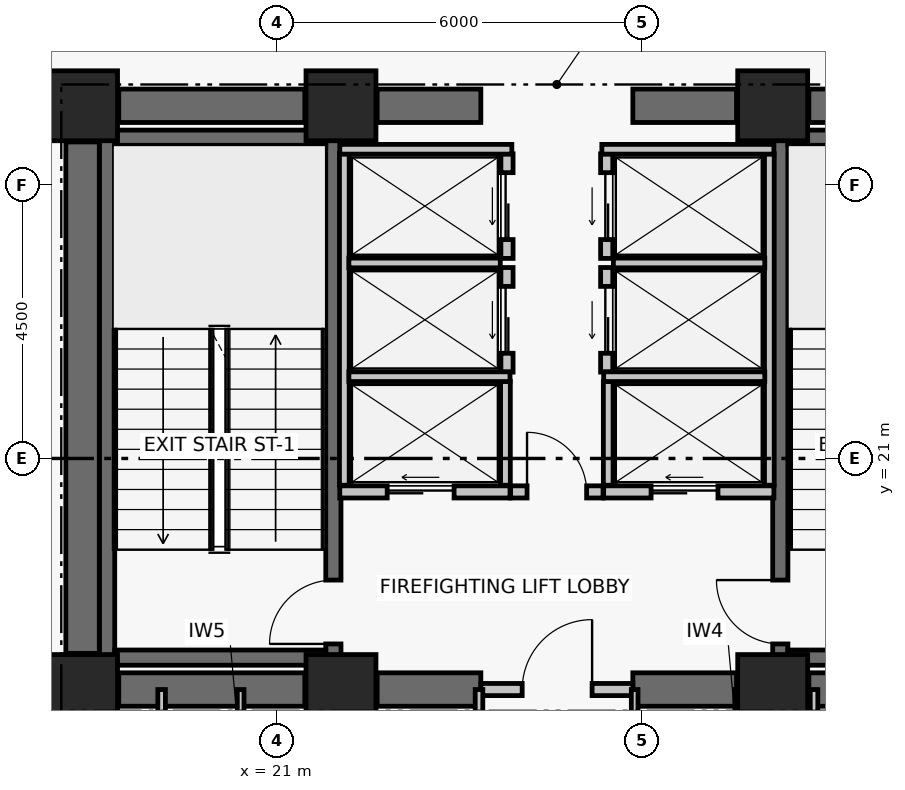
"""IFC4 building model, lengths in metres.
Left out: names, types, materials, properties, quantities, classifications, styles, units other than length and angle.
Written with IfcOpenShell. Run it as: python <this file> out.ifc"""

import sys

from ifc_helpers import new_model, si_unit, direction, frame, frame_2d, origin, origin_2d, place, context, subcontext, project, spatial, rectangle, extrude, element, fill, save


model = new_model("IFC4")
c1 = context("Model", 3, precision=1e-05, world=origin(), true_north=direction((0.0, 1.0)))
c2 = subcontext(c1, "Body", "Model", "MODEL_VIEW")
j1 = project(units=[si_unit("LENGTHUNIT", "METRE"), si_unit("PLANEANGLEUNIT", "RADIAN")], contexts=[c1])
p1 = place(None, origin())
s1 = spatial("IfcSite", under=j1, at=p1, CompositionType="ELEMENT")
p2 = place(p1, origin())
s2 = spatial("IfcBuilding", under=s1, at=p2, CompositionType="ELEMENT")
p3 = place(p2, frame((0.0, 0.0, 89.1)))
s3 = spatial("IfcBuildingStorey", under=s2, at=p3, CompositionType="ELEMENT", Elevation=89.1)
for number, where, z_axis, x_axis in (
    (1, (17.8, 17.2, 0.0), (0.0, 0.0, 1.0), (1.0, 0.0, 0.0)),
    (2, (22.05, 17.2, 0.0), (0.0, 0.0, 1.0), (1.0, 0.0, 0.0)),
    (3, (29.15, 17.2, 0.0), (0.0, 0.0, 1.0), (1.0, 0.0, 0.0)),
    (4, (17.8, 26.8, 0.0), (0.0, 0.0, 1.0), (1.0, 0.0, 0.0)),
    (5, (22.05, 26.8, 0.0), (0.0, 0.0, 1.0), (1.0, 0.0, 0.0)),
    (6, (29.15, 26.8, 0.0), (0.0, 0.0, 1.0), (1.0, 0.0, 0.0)),
):
    element("IfcColumn", number, at=place(p3, frame(where, z_axis=z_axis, x_axis=x_axis)), inside=s3, PredefinedType="COLUMN", context=c2, shape_type="SweptSolid", body=[
        extrude(rectangle(XDim=1.15, YDim=1.15, at=origin_2d()), origin(), (0.0, 0.0, 1.0), 3.72),
    ])
p4 = place(p3, frame((18.395, 17.2, 0.0), z_axis=(0.0, 0.0, 1.0), x_axis=(1.0, 0.0, 0.0)))
e7 = element("IfcWall", 7, at=p4, inside=s3, PredefinedType="SHEAR", context=c2, shape_type="SweptSolid", body=[
    extrude(rectangle(XDim=3.06, YDim=0.55, at=frame_2d((1.53, 0.0))), origin(), (0.0, 0.0, 1.0), 3.47),
])
p5 = place(p3, frame((22.645, 17.2, 0.0), z_axis=(0.0, 0.0, 1.0), x_axis=(1.0, 0.0, 0.0)))
e8 = element("IfcWall", 8, at=p5, inside=s3, PredefinedType="SHEAR", context=c2, shape_type="SweptSolid", body=[
    extrude(rectangle(XDim=1.705, YDim=0.55, at=frame_2d((0.853, 0.0))), origin(), (0.0, 0.0, 1.0), 3.47),
])
p6 = place(p3, frame((26.85, 17.2, 0.0), z_axis=(0.0, 0.0, 1.0), x_axis=(1.0, 0.0, 0.0)))
e9 = element("IfcWall", 9, at=p6, inside=s3, PredefinedType="SHEAR", context=c2, shape_type="SweptSolid", body=[
    extrude(rectangle(XDim=1.705, YDim=0.55, at=frame_2d((0.853, 0.0))), origin(), (0.0, 0.0, 1.0), 3.47),
])
p7 = place(p3, frame((29.745, 17.2, 0.0), z_axis=(0.0, 0.0, 1.0), x_axis=(1.0, 0.0, 0.0)))
e10 = element("IfcWall", 10, at=p7, inside=s3, PredefinedType="SHEAR", context=c2, shape_type="SweptSolid", body=[
    extrude(rectangle(XDim=3.06, YDim=0.55, at=frame_2d((1.53, 0.0))), origin(), (0.0, 0.0, 1.0), 3.47),
])
p8 = place(p3, frame((18.395, 26.8, 0.0), z_axis=(0.0, 0.0, 1.0), x_axis=(1.0, 0.0, 0.0)))
e11 = element("IfcWall", 11, at=p8, inside=s3, PredefinedType="SHEAR", context=c2, shape_type="SweptSolid", body=[
    extrude(rectangle(XDim=3.06, YDim=0.55, at=frame_2d((1.53, 0.0))), origin(), (0.0, 0.0, 1.0), 3.47),
])
p9 = place(p3, frame((22.645, 26.8, 0.0), z_axis=(0.0, 0.0, 1.0), x_axis=(1.0, 0.0, 0.0)))
e12 = element("IfcWall", 12, at=p9, inside=s3, PredefinedType="SHEAR", context=c2, shape_type="SweptSolid", body=[
    extrude(rectangle(XDim=1.705, YDim=0.55, at=frame_2d((0.853, 0.0))), origin(), (0.0, 0.0, 1.0), 3.47),
])
p10 = place(p3, frame((26.85, 26.8, 0.0), z_axis=(0.0, 0.0, 1.0), x_axis=(1.0, 0.0, 0.0)))
e13 = element("IfcWall", 13, at=p10, inside=s3, PredefinedType="SHEAR", context=c2, shape_type="SweptSolid", body=[
    extrude(rectangle(XDim=1.705, YDim=0.55, at=frame_2d((0.853, 0.0))), origin(), (0.0, 0.0, 1.0), 3.47),
])
p11 = place(p3, frame((29.745, 26.8, 0.0), z_axis=(0.0, 0.0, 1.0), x_axis=(1.0, 0.0, 0.0)))
e14 = element("IfcWall", 14, at=p11, inside=s3, PredefinedType="SHEAR", context=c2, shape_type="SweptSolid", body=[
    extrude(rectangle(XDim=3.06, YDim=0.55, at=frame_2d((1.53, 0.0))), origin(), (0.0, 0.0, 1.0), 3.47),
])
p12 = place(p3, frame((17.8, 17.795, 0.0), z_axis=(0.0, 0.0, 1.0), x_axis=(0.0, 1.0, 0.0)))
e15 = element("IfcWall", 15, at=p12, inside=s3, PredefinedType="SHEAR", context=c2, shape_type="SweptSolid", body=[
    extrude(rectangle(XDim=8.41, YDim=0.55, at=frame_2d((4.205, 0.0))), origin(), (0.0, 0.0, 1.0), 3.47),
])
p13 = place(p3, frame((18.204, 17.6, 0.0), z_axis=(0.0, 0.0, 1.0), x_axis=(0.0, 1.0, 0.0)))
e16 = element("IfcWall", 16, at=p13, inside=s3, PredefinedType="SHEAR", context=c2, shape_type="SweptSolid", body=[
    extrude(rectangle(XDim=8.8, YDim=0.25, at=frame_2d((4.4, 0.0))), origin(), (0.0, 0.0, 1.0), 3.47),
])
p14 = place(p3, frame((21.925, 17.6, 0.0), z_axis=(0.0, 0.0, 1.0), x_axis=(0.0, 1.0, 0.0)))
e17 = element("IfcWall", 17, at=p14, inside=s3, PredefinedType="SHEAR", context=c2, shape_type="SweptSolid", body=[
    extrude(rectangle(XDim=8.8, YDim=0.25, at=frame_2d((4.4, 0.0))), origin(), (0.0, 0.0, 1.0), 3.47),
])
p15 = place(p14, frame((0.35, 0.0, 0.0)))
e18 = element("IfcOpeningElement", 18, at=p15, cuts=e17, PredefinedType="OPENING", context=c2, shape_type="SweptSolid", body=[
    extrude(rectangle(XDim=1.05, YDim=2.08, at=frame_2d((0.525, 1.04))), frame((0.0, 0.135, 0.0), z_axis=(0.0, -1.0, 0.0), x_axis=(1.0, 0.0, 0.0)), (0.0, 0.0, 1.0), 0.27),
])
for number, where, z_axis, x_axis in (
    (19, (18.329, 17.725, 0.0), (0.0, 0.0, 1.0), (1.0, 0.0, 0.0)),
    (20, (18.329, 26.275, 0.0), (0.0, 0.0, 1.0), (1.0, 0.0, 0.0)),
):
    element("IfcWall", number, at=place(p3, frame(where, z_axis=z_axis, x_axis=x_axis)), inside=s3, PredefinedType="SHEAR", context=c2, shape_type="SweptSolid", body=[
        extrude(rectangle(XDim=3.471, YDim=0.25, at=frame_2d((1.735, 0.0))), origin(), (0.0, 0.0, 1.0), 3.47),
    ])
p16 = place(p3, frame((29.275, 17.6, 0.0), z_axis=(0.0, 0.0, 1.0), x_axis=(0.0, 1.0, 0.0)))
e21 = element("IfcWall", 21, at=p16, inside=s3, PredefinedType="SHEAR", context=c2, shape_type="SweptSolid", body=[
    extrude(rectangle(XDim=8.8, YDim=0.25, at=frame_2d((4.4, 0.0))), origin(), (0.0, 0.0, 1.0), 3.47),
])
p17 = place(p16, frame((0.35, 0.0, 0.0)))
e22 = element("IfcOpeningElement", 22, at=p17, cuts=e21, PredefinedType="OPENING", context=c2, shape_type="SweptSolid", body=[
    extrude(rectangle(XDim=1.05, YDim=2.08, at=frame_2d((0.525, 1.04))), frame((0.0, 0.135, 0.0), z_axis=(0.0, -1.0, 0.0), x_axis=(1.0, 0.0, 0.0)), (0.0, 0.0, 1.0), 0.27),
])
for number, where, z_axis, x_axis in (
    (23, (29.4, 17.725, 0.0), (0.0, 0.0, 1.0), (1.0, 0.0, 0.0)),
    (24, (29.4, 26.275, 0.0), (0.0, 0.0, 1.0), (1.0, 0.0, 0.0)),
):
    element("IfcWall", number, at=place(p3, frame(where, z_axis=z_axis, x_axis=x_axis)), inside=s3, PredefinedType="SHEAR", context=c2, shape_type="SweptSolid", body=[
        extrude(rectangle(XDim=3.471, YDim=0.25, at=frame_2d((1.736, 0.0))), origin(), (0.0, 0.0, 1.0), 3.47),
    ])
p18 = place(p3, frame((24.35, 17.2, 0.0), z_axis=(0.0, 0.0, 1.0), x_axis=(1.0, 0.0, 0.0)))
e25 = element("IfcWall", 25, at=p18, inside=s3, PredefinedType="PARTITIONING", context=c2, shape_type="SweptSolid", body=[
    extrude(rectangle(XDim=2.5, YDim=0.2, at=frame_2d((1.25, 0.0))), origin(), (0.0, 0.0, 1.0), 2.6),
])
p19 = place(p18, frame((0.68, 0.0, 0.0)))
e26 = element("IfcOpeningElement", 26, at=p19, cuts=e25, PredefinedType="OPENING", context=c2, shape_type="SweptSolid", body=[
    extrude(rectangle(XDim=1.15, YDim=2.08, at=frame_2d((0.575, 1.04))), frame((0.0, 0.11, 0.0), z_axis=(0.0, -1.0, 0.0), x_axis=(1.0, 0.0, 0.0)), (0.0, 0.0, 1.0), 0.22),
])
p20 = place(p3, frame((24.84, 20.45, 0.0), z_axis=(0.0, 0.0, 1.0), x_axis=(1.0, 0.0, 0.0)))
e27 = element("IfcWall", 27, at=p20, inside=s3, PredefinedType="PARTITIONING", context=c2, shape_type="SweptSolid", body=[
    extrude(rectangle(XDim=1.52, YDim=0.2, at=frame_2d((0.76, 0.0))), origin(), (0.0, 0.0, 1.0), 3.47),
])
p21 = place(p20, frame((0.27, 0.0, 0.0)))
e28 = element("IfcOpeningElement", 28, at=p21, cuts=e27, PredefinedType="OPENING", context=c2, shape_type="SweptSolid", body=[
    extrude(rectangle(XDim=0.98, YDim=2.06, at=frame_2d((0.49, 1.03))), frame((0.0, 0.11, 0.0), z_axis=(0.0, -1.0, 0.0), x_axis=(1.0, 0.0, 0.0)), (0.0, 0.0, 1.0), 0.22),
])
p22 = place(p3, frame((22.03, 20.45, 0.0), z_axis=(0.0, 0.0, 1.0), x_axis=(1.0, 0.0, 0.0)))
e29 = element("IfcWall", 29, at=p22, inside=s3, PredefinedType="PARTITIONING", context=c2, shape_type="SweptSolid", body=[
    extrude(rectangle(XDim=2.8, YDim=0.2, at=frame_2d((1.4, 0.0))), origin(), (0.0, 0.0, 1.0), 3.47),
])
p23 = place(p22, frame((0.78, 0.0, 0.0)))
e30 = element("IfcOpeningElement", 30, at=p23, cuts=e29, PredefinedType="OPENING", context=c2, shape_type="SweptSolid", body=[
    extrude(rectangle(XDim=1.1, YDim=2.08, at=frame_2d((0.55, 1.04))), frame((0.0, 0.11, 0.0), z_axis=(0.0, -1.0, 0.0), x_axis=(1.0, 0.0, 0.0)), (0.0, 0.0, 1.0), 0.22),
])
p24 = place(p3, frame((26.37, 20.45, 0.0), z_axis=(0.0, 0.0, 1.0), x_axis=(1.0, 0.0, 0.0)))
e31 = element("IfcWall", 31, at=p24, inside=s3, PredefinedType="PARTITIONING", context=c2, shape_type="SweptSolid", body=[
    extrude(rectangle(XDim=2.8, YDim=0.2, at=frame_2d((1.4, 0.0))), origin(), (0.0, 0.0, 1.0), 3.47),
])
p25 = place(p24, frame((0.78, 0.0, 0.0)))
e32 = element("IfcOpeningElement", 32, at=p25, cuts=e31, PredefinedType="OPENING", context=c2, shape_type="SweptSolid", body=[
    extrude(rectangle(XDim=1.1, YDim=2.08, at=frame_2d((0.55, 1.04))), frame((0.0, 0.11, 0.0), z_axis=(0.0, -1.0, 0.0), x_axis=(1.0, 0.0, 0.0)), (0.0, 0.0, 1.0), 0.22),
])
p26 = place(p3, frame((24.78, 22.42, 0.0), z_axis=(0.0, 0.0, 1.0), x_axis=(0.0, 1.0, 0.0)))
e33 = element("IfcWall", 33, at=p26, inside=s3, PredefinedType="PARTITIONING", context=c2, shape_type="SweptSolid", body=[
    extrude(rectangle(XDim=1.72, YDim=0.2, at=frame_2d((0.86, 0.0))), origin(), (0.0, 0.0, 1.0), 3.47),
])
p27 = place(p26, frame((0.31, 0.0, 0.0)))
e34 = element("IfcOpeningElement", 34, at=p27, cuts=e33, PredefinedType="OPENING", context=c2, shape_type="SweptSolid", body=[
    extrude(rectangle(XDim=1.1, YDim=2.08, at=frame_2d((0.55, 1.04))), frame((0.0, 0.11, 0.0), z_axis=(0.0, -1.0, 0.0), x_axis=(1.0, 0.0, 0.0)), (0.0, 0.0, 1.0), 0.22),
])
p28 = place(p3, frame((24.78, 24.29, 0.0), z_axis=(0.0, 0.0, 1.0), x_axis=(0.0, 1.0, 0.0)))
e35 = element("IfcWall", 35, at=p28, inside=s3, PredefinedType="PARTITIONING", context=c2, shape_type="SweptSolid", body=[
    extrude(rectangle(XDim=1.72, YDim=0.2, at=frame_2d((0.86, 0.0))), origin(), (0.0, 0.0, 1.0), 3.47),
])
p29 = place(p28, frame((0.31, 0.0, 0.0)))
e36 = element("IfcOpeningElement", 36, at=p29, cuts=e35, PredefinedType="OPENING", context=c2, shape_type="SweptSolid", body=[
    extrude(rectangle(XDim=1.1, YDim=2.08, at=frame_2d((0.55, 1.04))), frame((0.0, 0.11, 0.0), z_axis=(0.0, -1.0, 0.0), x_axis=(1.0, 0.0, 0.0)), (0.0, 0.0, 1.0), 0.22),
])
p30 = place(p3, frame((26.42, 22.42, 0.0), z_axis=(0.0, 0.0, 1.0), x_axis=(0.0, 1.0, 0.0)))
e37 = element("IfcWall", 37, at=p30, inside=s3, PredefinedType="PARTITIONING", context=c2, shape_type="SweptSolid", body=[
    extrude(rectangle(XDim=1.72, YDim=0.2, at=frame_2d((0.86, 0.0))), origin(), (0.0, 0.0, 1.0), 3.47),
])
p31 = place(p30, frame((0.31, 0.0, 0.0)))
e38 = element("IfcOpeningElement", 38, at=p31, cuts=e37, PredefinedType="OPENING", context=c2, shape_type="SweptSolid", body=[
    extrude(rectangle(XDim=1.1, YDim=2.08, at=frame_2d((0.55, 1.04))), frame((0.0, 0.11, 0.0), z_axis=(0.0, -1.0, 0.0), x_axis=(1.0, 0.0, 0.0)), (0.0, 0.0, 1.0), 0.22),
])
p32 = place(p3, frame((26.42, 24.29, 0.0), z_axis=(0.0, 0.0, 1.0), x_axis=(0.0, 1.0, 0.0)))
e39 = element("IfcWall", 39, at=p32, inside=s3, PredefinedType="PARTITIONING", context=c2, shape_type="SweptSolid", body=[
    extrude(rectangle(XDim=1.72, YDim=0.2, at=frame_2d((0.86, 0.0))), origin(), (0.0, 0.0, 1.0), 3.47),
])
p33 = place(p32, frame((0.31, 0.0, 0.0)))
e40 = element("IfcOpeningElement", 40, at=p33, cuts=e39, PredefinedType="OPENING", context=c2, shape_type="SweptSolid", body=[
    extrude(rectangle(XDim=1.1, YDim=2.08, at=frame_2d((0.55, 1.04))), frame((0.0, 0.11, 0.0), z_axis=(0.0, -1.0, 0.0), x_axis=(1.0, 0.0, 0.0)), (0.0, 0.0, 1.0), 0.22),
])
p34 = place(p3, frame((22.105, 20.56, 0.0), z_axis=(0.0, 0.0, 1.0), x_axis=(0.0, 1.0, 0.0)))
e41 = element("IfcWall", 41, at=p34, inside=s3, PredefinedType="PARTITIONING", context=c2, shape_type="SweptSolid", body=[
    extrude(rectangle(XDim=5.45, YDim=0.16, at=frame_2d((2.725, 0.0))), origin(), (0.0, 0.0, 1.0), 3.47),
])
p35 = place(p3, frame((24.755, 20.56, 0.0), z_axis=(0.0, 0.0, 1.0), x_axis=(0.0, 1.0, 0.0)))
e42 = element("IfcWall", 42, at=p35, inside=s3, PredefinedType="PARTITIONING", context=c2, shape_type="SweptSolid", body=[
    extrude(rectangle(XDim=1.71, YDim=0.16, at=frame_2d((0.855, 0.0))), origin(), (0.0, 0.0, 1.0), 3.47),
])
p36 = place(p3, frame((22.18, 22.345, 0.0), z_axis=(0.0, 0.0, 1.0), x_axis=(1.0, 0.0, 0.0)))
e43 = element("IfcWall", 43, at=p36, inside=s3, PredefinedType="PARTITIONING", context=c2, shape_type="SweptSolid", body=[
    extrude(rectangle(XDim=2.65, YDim=0.16, at=frame_2d((1.325, 0.0))), origin(), (0.0, 0.0, 1.0), 3.47),
])
p37 = place(p3, frame((22.18, 24.215, 0.0), z_axis=(0.0, 0.0, 1.0), x_axis=(1.0, 0.0, 0.0)))
e44 = element("IfcWall", 44, at=p37, inside=s3, PredefinedType="PARTITIONING", context=c2, shape_type="SweptSolid", body=[
    extrude(rectangle(XDim=2.49, YDim=0.16, at=frame_2d((1.245, 0.0))), origin(), (0.0, 0.0, 1.0), 3.47),
])
p38 = place(p3, frame((22.03, 26.085, 0.0), z_axis=(0.0, 0.0, 1.0), x_axis=(1.0, 0.0, 0.0)))
e45 = element("IfcWall", 45, at=p38, inside=s3, PredefinedType="PARTITIONING", context=c2, shape_type="SweptSolid", body=[
    extrude(rectangle(XDim=2.83, YDim=0.16, at=frame_2d((1.415, 0.0))), origin(), (0.0, 0.0, 1.0), 3.47),
])
p39 = place(p3, frame((29.095, 20.56, 0.0), z_axis=(0.0, 0.0, 1.0), x_axis=(0.0, 1.0, 0.0)))
e46 = element("IfcWall", 46, at=p39, inside=s3, PredefinedType="PARTITIONING", context=c2, shape_type="SweptSolid", body=[
    extrude(rectangle(XDim=5.45, YDim=0.16, at=frame_2d((2.725, 0.0))), origin(), (0.0, 0.0, 1.0), 3.47),
])
p40 = place(p3, frame((26.445, 20.56, 0.0), z_axis=(0.0, 0.0, 1.0), x_axis=(0.0, 1.0, 0.0)))
e47 = element("IfcWall", 47, at=p40, inside=s3, PredefinedType="PARTITIONING", context=c2, shape_type="SweptSolid", body=[
    extrude(rectangle(XDim=1.71, YDim=0.16, at=frame_2d((0.855, 0.0))), origin(), (0.0, 0.0, 1.0), 3.47),
])
p41 = place(p3, frame((26.37, 22.345, 0.0), z_axis=(0.0, 0.0, 1.0), x_axis=(1.0, 0.0, 0.0)))
e48 = element("IfcWall", 48, at=p41, inside=s3, PredefinedType="PARTITIONING", context=c2, shape_type="SweptSolid", body=[
    extrude(rectangle(XDim=2.65, YDim=0.16, at=frame_2d((1.325, 0.0))), origin(), (0.0, 0.0, 1.0), 3.47),
])
p42 = place(p3, frame((26.53, 24.215, 0.0), z_axis=(0.0, 0.0, 1.0), x_axis=(1.0, 0.0, 0.0)))
e49 = element("IfcWall", 49, at=p42, inside=s3, PredefinedType="PARTITIONING", context=c2, shape_type="SweptSolid", body=[
    extrude(rectangle(XDim=2.49, YDim=0.16, at=frame_2d((1.245, 0.0))), origin(), (0.0, 0.0, 1.0), 3.47),
])
p43 = place(p3, frame((26.34, 26.085, 0.0), z_axis=(0.0, 0.0, 1.0), x_axis=(1.0, 0.0, 0.0)))
e50 = element("IfcWall", 50, at=p43, inside=s3, PredefinedType="PARTITIONING", context=c2, shape_type="SweptSolid", body=[
    extrude(rectangle(XDim=2.83, YDim=0.16, at=frame_2d((1.415, 0.0))), origin(), (0.0, 0.0, 1.0), 3.47),
])
p44 = place(p3, frame((19.1, 14.95, 0.0), z_axis=(0.0, 0.0, 1.0), x_axis=(0.0, 1.0, 0.0)))
e51 = element("IfcWall", 51, at=p44, inside=s3, PredefinedType="PARTITIONING", context=c2, shape_type="SweptSolid", body=[
    extrude(rectangle(XDim=2.25, YDim=0.125, at=frame_2d((1.125, 0.0))), origin(), (0.0, 0.0, 1.0), 2.6),
])
p45 = place(p3, frame((20.4, 14.95, 0.0), z_axis=(0.0, 0.0, 1.0), x_axis=(0.0, 1.0, 0.0)))
e52 = element("IfcWall", 52, at=p45, inside=s3, PredefinedType="PARTITIONING", context=c2, shape_type="SweptSolid", body=[
    extrude(rectangle(XDim=2.25, YDim=0.11, at=frame_2d((1.125, 0.0))), origin(), (0.0, 0.0, 1.0), 2.6),
])
for number, where, z_axis, x_axis in (
    (53, (22.36, 14.95, 0.0), (0.0, 0.0, 1.0), (0.0, 1.0, 0.0)),
    (54, (24.32, 14.95, 0.0), (0.0, 0.0, 1.0), (0.0, 1.0, 0.0)),
):
    element("IfcWall", number, at=place(p3, frame(where, z_axis=z_axis, x_axis=x_axis)), inside=s3, PredefinedType="PARTITIONING", context=c2, shape_type="SweptSolid", body=[
        extrude(rectangle(XDim=2.25, YDim=0.125, at=frame_2d((1.125, 0.0))), origin(), (0.0, 0.0, 1.0), 2.6),
    ])
p46 = place(p3, frame((26.88, 14.95, 0.0), z_axis=(0.0, 0.0, 1.0), x_axis=(0.0, 1.0, 0.0)))
e55 = element("IfcWall", 55, at=p46, inside=s3, PredefinedType="PARTITIONING", context=c2, shape_type="SweptSolid", body=[
    extrude(rectangle(XDim=2.25, YDim=0.11, at=frame_2d((1.125, 0.0))), origin(), (0.0, 0.0, 1.0), 2.6),
])
for number, where, z_axis, x_axis in (
    (56, (28.59, 14.95, 0.0), (0.0, 0.0, 1.0), (0.0, 1.0, 0.0)),
    (57, (29.83, 14.95, 0.0), (0.0, 0.0, 1.0), (0.0, 1.0, 0.0)),
):
    element("IfcWall", number, at=place(p3, frame(where, z_axis=z_axis, x_axis=x_axis)), inside=s3, PredefinedType="PARTITIONING", context=c2, shape_type="SweptSolid", body=[
        extrude(rectangle(XDim=2.25, YDim=0.125, at=frame_2d((1.125, 0.0))), origin(), (0.0, 0.0, 1.0), 2.6),
    ])
p47 = place(p15, origin())
e58 = element("IfcDoor", 58, at=p47, inside=s3, OperationType="SINGLE_SWING_LEFT", PredefinedType="DOOR", context=c2, shape_type="SweptSolid", body=[
    extrude(rectangle(XDim=1.05, YDim=2.08, at=frame_2d((0.525, 1.04))), frame((0.0, 0.025, 0.0), z_axis=(0.0, -1.0, 0.0), x_axis=(1.0, 0.0, 0.0)), (0.0, 0.0, 1.0), 0.05),
])
fill(e18, e58)
p48 = place(p17, origin())
e59 = element("IfcDoor", 59, at=p48, inside=s3, OperationType="SINGLE_SWING_RIGHT", PredefinedType="DOOR", context=c2, shape_type="SweptSolid", body=[
    extrude(rectangle(XDim=1.05, YDim=2.08, at=frame_2d((0.525, 1.04))), frame((0.0, 0.025, 0.0), z_axis=(0.0, -1.0, 0.0), x_axis=(1.0, 0.0, 0.0)), (0.0, 0.0, 1.0), 0.05),
])
fill(e22, e59)
p49 = place(p19, origin())
e60 = element("IfcDoor", 60, at=p49, inside=s3, OperationType="SINGLE_SWING_RIGHT", PredefinedType="DOOR", context=c2, shape_type="SweptSolid", body=[
    extrude(rectangle(XDim=1.15, YDim=2.08, at=frame_2d((0.575, 1.04))), frame((0.0, 0.025, 0.0), z_axis=(0.0, -1.0, 0.0), x_axis=(1.0, 0.0, 0.0)), (0.0, 0.0, 1.0), 0.05),
])
fill(e26, e60)
p50 = place(p21, origin())
e61 = element("IfcDoor", 61, at=p50, inside=s3, OperationType="SINGLE_SWING_LEFT", PredefinedType="DOOR", context=c2, shape_type="SweptSolid", body=[
    extrude(rectangle(XDim=0.98, YDim=2.06, at=frame_2d((0.49, 1.03))), frame((0.0, 0.025, 0.0), z_axis=(0.0, -1.0, 0.0), x_axis=(1.0, 0.0, 0.0)), (0.0, 0.0, 1.0), 0.05),
])
fill(e28, e61)
p51 = place(p23, origin())
e62 = element("IfcDoor", 62, at=p51, inside=s3, OperationType="DOUBLE_DOOR_SLIDING", PredefinedType="DOOR", context=c2, shape_type="SweptSolid", body=[
    extrude(rectangle(XDim=1.1, YDim=2.08, at=frame_2d((0.55, 1.04))), frame((0.0, 0.025, 0.0), z_axis=(0.0, -1.0, 0.0), x_axis=(1.0, 0.0, 0.0)), (0.0, 0.0, 1.0), 0.05),
])
fill(e30, e62)
p52 = place(p25, origin())
e63 = element("IfcDoor", 63, at=p52, inside=s3, OperationType="DOUBLE_DOOR_SLIDING", PredefinedType="DOOR", context=c2, shape_type="SweptSolid", body=[
    extrude(rectangle(XDim=1.1, YDim=2.08, at=frame_2d((0.55, 1.04))), frame((0.0, 0.025, 0.0), z_axis=(0.0, -1.0, 0.0), x_axis=(1.0, 0.0, 0.0)), (0.0, 0.0, 1.0), 0.05),
])
fill(e32, e63)
p53 = place(p27, origin())
e64 = element("IfcDoor", 64, at=p53, inside=s3, OperationType="DOUBLE_DOOR_SLIDING", PredefinedType="DOOR", context=c2, shape_type="SweptSolid", body=[
    extrude(rectangle(XDim=1.1, YDim=2.08, at=frame_2d((0.55, 1.04))), frame((0.0, 0.025, 0.0), z_axis=(0.0, -1.0, 0.0), x_axis=(1.0, 0.0, 0.0)), (0.0, 0.0, 1.0), 0.05),
])
fill(e34, e64)
p54 = place(p29, origin())
e65 = element("IfcDoor", 65, at=p54, inside=s3, OperationType="DOUBLE_DOOR_SLIDING", PredefinedType="DOOR", context=c2, shape_type="SweptSolid", body=[
    extrude(rectangle(XDim=1.1, YDim=2.08, at=frame_2d((0.55, 1.04))), frame((0.0, 0.025, 0.0), z_axis=(0.0, -1.0, 0.0), x_axis=(1.0, 0.0, 0.0)), (0.0, 0.0, 1.0), 0.05),
])
fill(e36, e65)
p55 = place(p31, origin())
e66 = element("IfcDoor", 66, at=p55, inside=s3, OperationType="DOUBLE_DOOR_SLIDING", PredefinedType="DOOR", context=c2, shape_type="SweptSolid", body=[
    extrude(rectangle(XDim=1.1, YDim=2.08, at=frame_2d((0.55, 1.04))), frame((0.0, 0.025, 0.0), z_axis=(0.0, -1.0, 0.0), x_axis=(1.0, 0.0, 0.0)), (0.0, 0.0, 1.0), 0.05),
])
fill(e38, e66)
p56 = place(p33, origin())
e67 = element("IfcDoor", 67, at=p56, inside=s3, OperationType="DOUBLE_DOOR_SLIDING", PredefinedType="DOOR", context=c2, shape_type="SweptSolid", body=[
    extrude(rectangle(XDim=1.1, YDim=2.08, at=frame_2d((0.55, 1.04))), frame((0.0, 0.025, 0.0), z_axis=(0.0, -1.0, 0.0), x_axis=(1.0, 0.0, 0.0)), (0.0, 0.0, 1.0), 0.05),
])
fill(e40, e67)
save(model, sys.argv[1])
